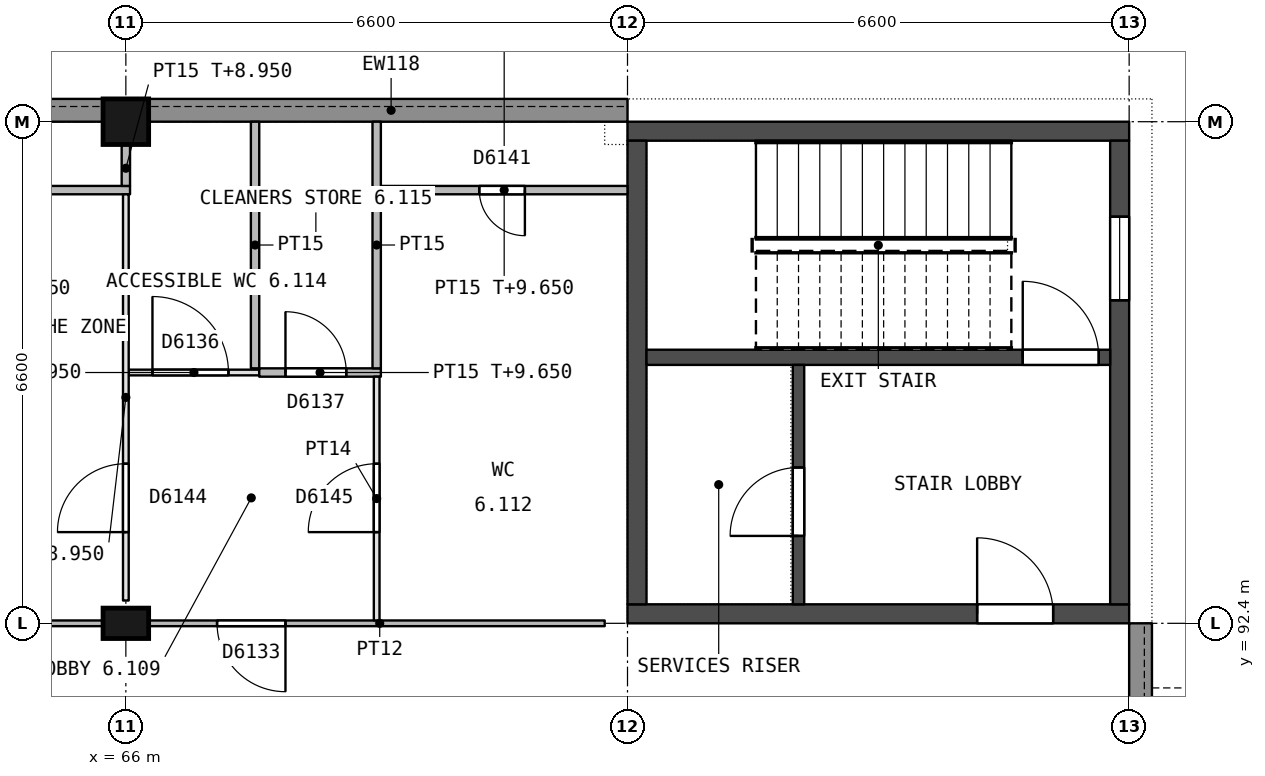
"""IFC4 building model, lengths in metres.
Left out: names, types, materials, properties, quantities, classifications, styles, units other than length and angle.
Written with IfcOpenShell. Run it as: python <this file> out.ifc"""

import sys

from ifc_helpers import new_model, si_unit, direction, frame, frame_2d, origin, origin_2d, place, context, subcontext, project, spatial, rectangle, extrude, element, fill, save


model = new_model("IFC4")
c1 = context("Model", 3, precision=1e-05, world=origin(), true_north=direction((0.0, 1.0)))
c2 = subcontext(c1, "Body", "Model", "MODEL_VIEW")
j1 = project(units=[si_unit("LENGTHUNIT", "METRE"), si_unit("PLANEANGLEUNIT", "RADIAN")], contexts=[c1])
p1 = place(None, origin())
s1 = spatial("IfcSite", under=j1, at=p1, CompositionType="ELEMENT")
p2 = place(p1, origin())
s2 = spatial("IfcBuilding", under=s1, at=p2, CompositionType="ELEMENT")
p3 = place(p2, frame((0.0, 0.0, 5.4)))
s3 = spatial("IfcBuildingStorey", under=s2, at=p3, CompositionType="ELEMENT", Elevation=5.4)
p4 = place(p3, frame((66.0, 92.4, 0.0), z_axis=(0.0, 0.0, 1.0), x_axis=(1.0, 0.0, 0.0)))
e1 = element("IfcColumn", 1, at=p4, inside=s3, PredefinedType="COLUMN", context=c2, shape_type="SweptSolid", body=[
    extrude(rectangle(XDim=0.6, YDim=0.4, at=origin_2d()), origin(), (0.0, 0.0, 1.0), 4.5),
])
p5 = place(p3, frame((66.0, 99.0, 0.0), z_axis=(0.0, 0.0, 1.0), x_axis=(1.0, 0.0, 0.0)))
e2 = element("IfcColumn", 2, at=p5, inside=s3, PredefinedType="COLUMN", context=c2, shape_type="SweptSolid", body=[
    extrude(rectangle(XDim=0.6, YDim=0.6, at=origin_2d()), origin(), (0.0, 0.0, 1.0), 4.5),
])
p6 = place(p3, frame((72.6, 92.525, 0.0), z_axis=(0.0, 0.0, 1.0), x_axis=(1.0, 0.0, 0.0)))
e3 = element("IfcWall", 3, at=p6, inside=s3, PredefinedType="SHEAR", context=c2, shape_type="SweptSolid", body=[
    extrude(rectangle(XDim=6.6, YDim=0.25, at=frame_2d((3.3, 0.0))), origin(), (0.0, 0.0, 1.0), 4.25),
])
p7 = place(p6, frame((4.6, 0.0, 0.0)))
e4 = element("IfcOpeningElement", 4, at=p7, cuts=e3, PredefinedType="OPENING", context=c2, shape_type="SweptSolid", body=[
    extrude(rectangle(XDim=1.0, YDim=2.1, at=frame_2d((0.5, 1.05))), frame((0.0, 0.135, 0.0), z_axis=(0.0, -1.0, 0.0), x_axis=(1.0, 0.0, 0.0)), (0.0, 0.0, 1.0), 0.27),
])
p8 = place(p3, frame((72.6, 98.875, 0.0), z_axis=(0.0, 0.0, 1.0), x_axis=(1.0, 0.0, 0.0)))
e5 = element("IfcWall", 5, at=p8, inside=s3, PredefinedType="SHEAR", context=c2, shape_type="SweptSolid", body=[
    extrude(rectangle(XDim=6.6, YDim=0.25, at=frame_2d((3.3, 0.0))), origin(), (0.0, 0.0, 1.0), 4.25),
])
p9 = place(p3, frame((79.075, 92.65, 0.0), z_axis=(0.0, 0.0, 1.0), x_axis=(0.0, 1.0, 0.0)))
e6 = element("IfcWall", 6, at=p9, inside=s3, PredefinedType="SHEAR", context=c2, shape_type="SweptSolid", body=[
    extrude(rectangle(XDim=6.1, YDim=0.25, at=frame_2d((3.05, 0.0))), origin(), (0.0, 0.0, 1.0), 4.25),
])
p10 = place(p9, frame((4.0, 0.0, 0.7)))
e7 = element("IfcOpeningElement", 7, at=p10, cuts=e6, PredefinedType="OPENING", context=c2, shape_type="SweptSolid", body=[
    extrude(rectangle(XDim=1.1, YDim=1.5, at=frame_2d((0.55, 0.75))), frame((0.0, 0.135, 0.0), z_axis=(0.0, -1.0, 0.0), x_axis=(1.0, 0.0, 0.0)), (0.0, 0.0, 1.0), 0.27),
])
p11 = place(p3, frame((72.725, 92.65, 0.0), z_axis=(0.0, 0.0, 1.0), x_axis=(0.0, 1.0, 0.0)))
e8 = element("IfcWall", 8, at=p11, inside=s3, PredefinedType="SHEAR", context=c2, shape_type="SweptSolid", body=[
    extrude(rectangle(XDim=6.1, YDim=0.25, at=frame_2d((3.05, 0.0))), origin(), (0.0, 0.0, 1.0), 4.25),
])
p12 = place(p3, frame((72.85, 95.9, 0.0), z_axis=(0.0, 0.0, 1.0), x_axis=(1.0, 0.0, 0.0)))
e9 = element("IfcWall", 9, at=p12, inside=s3, PredefinedType="SHEAR", context=c2, shape_type="SweptSolid", body=[
    extrude(rectangle(XDim=6.1, YDim=0.2, at=frame_2d((3.05, 0.0))), origin(), (0.0, 0.0, 1.0), 4.25),
])
p13 = place(p12, frame((4.95, 0.0, 0.0)))
e10 = element("IfcOpeningElement", 10, at=p13, cuts=e9, PredefinedType="OPENING", context=c2, shape_type="SweptSolid", body=[
    extrude(rectangle(XDim=1.0, YDim=2.1, at=frame_2d((0.5, 1.05))), frame((0.0, 0.11, 0.0), z_axis=(0.0, -1.0, 0.0), x_axis=(1.0, 0.0, 0.0)), (0.0, 0.0, 1.0), 0.22),
])
p14 = place(p3, frame((74.85, 92.65, 0.0), z_axis=(0.0, 0.0, 1.0), x_axis=(0.0, 1.0, 0.0)))
e11 = element("IfcWall", 11, at=p14, inside=s3, PredefinedType="SHEAR", context=c2, shape_type="SweptSolid", body=[
    extrude(rectangle(XDim=3.15, YDim=0.15, at=frame_2d((1.575, 0.0))), origin(), (0.0, 0.0, 1.0), 4.25),
])
p15 = place(p14, frame((0.9, 0.0, 0.0)))
e12 = element("IfcOpeningElement", 12, at=p15, cuts=e11, PredefinedType="OPENING", context=c2, shape_type="SweptSolid", body=[
    extrude(rectangle(XDim=0.9, YDim=2.1, at=frame_2d((0.45, 1.05))), frame((0.0, 0.085, 0.0), z_axis=(0.0, -1.0, 0.0), x_axis=(1.0, 0.0, 0.0)), (0.0, 0.0, 1.0), 0.17),
])
p16 = place(p3, frame((79.35, 92.4, 0.0), z_axis=(0.0, 0.0, 1.0), x_axis=(0.0, -1.0, 0.0)))
e13 = element("IfcWall", 13, at=p16, inside=s3, PredefinedType="STANDARD", context=c2, shape_type="SweptSolid", body=[
    extrude(rectangle(XDim=3.1, YDim=0.3, at=frame_2d((1.55, 0.0))), origin(), (0.0, 0.0, 1.0), 3.65),
])
p17 = place(p16, frame((1.05, 0.0, 1.1)))
e14 = element("IfcOpeningElement", 14, at=p17, cuts=e13, PredefinedType="OPENING", context=c2, shape_type="SweptSolid", body=[
    extrude(rectangle(XDim=1.2, YDim=1.2, at=frame_2d((0.6, 0.6))), frame((0.0, 0.16, 0.0), z_axis=(0.0, -1.0, 0.0), x_axis=(1.0, 0.0, 0.0)), (0.0, 0.0, 1.0), 0.32),
])
p18 = place(p3, frame((59.7, 99.15, 0.0), z_axis=(0.0, 0.0, 1.0), x_axis=(1.0, 0.0, 0.0)))
e15 = element("IfcWall", 15, at=p18, inside=s3, PredefinedType="STANDARD", context=c2, shape_type="SweptSolid", body=[
    extrude(rectangle(XDim=6.0, YDim=0.3, at=frame_2d((3.0, 0.0))), origin(), (0.0, 0.0, 1.0), 3.65),
])
p19 = place(p3, frame((66.3, 99.15, 0.0), z_axis=(0.0, 0.0, 1.0), x_axis=(1.0, 0.0, 0.0)))
e16 = element("IfcWall", 16, at=p19, inside=s3, PredefinedType="STANDARD", context=c2, shape_type="SweptSolid", body=[
    extrude(rectangle(XDim=6.3, YDim=0.3, at=frame_2d((3.15, 0.0))), origin(), (0.0, 0.0, 1.0), 3.65),
])
p20 = place(p3, frame((62.738, 92.4, 0.0), z_axis=(0.0, 0.0, 1.0), x_axis=(1.0, 0.0, 0.0)))
e17 = element("IfcWall", 17, at=p20, inside=s3, PredefinedType="PARTITIONING", context=c2, shape_type="SweptSolid", body=[
    extrude(rectangle(XDim=2.962, YDim=0.075, at=frame_2d((1.481, 0.0))), origin(), (0.0, 0.0, 1.0), 3.65),
])
p21 = place(p3, frame((66.3, 92.4, 0.0), z_axis=(0.0, 0.0, 1.0), x_axis=(1.0, 0.0, 0.0)))
e18 = element("IfcWall", 18, at=p21, inside=s3, PredefinedType="PARTITIONING", context=c2, shape_type="SweptSolid", body=[
    extrude(rectangle(XDim=6.0, YDim=0.075, at=frame_2d((3.0, 0.0))), origin(), (0.0, 0.0, 1.0), 3.65),
])
p22 = place(p21, frame((0.9, 0.0, 0.0)))
e19 = element("IfcOpeningElement", 19, at=p22, cuts=e18, PredefinedType="OPENING", context=c2, shape_type="SweptSolid", body=[
    extrude(rectangle(XDim=0.9, YDim=2.1, at=frame_2d((0.45, 1.05))), frame((0.0, 0.047, 0.0), z_axis=(0.0, -1.0, 0.0), x_axis=(1.0, 0.0, 0.0)), (0.0, 0.0, 1.0), 0.095),
])
p23 = place(p3, frame((67.755, 95.7, 0.0), z_axis=(0.0, 0.0, 1.0), x_axis=(-1.0, 0.0, 0.0)))
e20 = element("IfcWall", 20, at=p23, inside=s3, PredefinedType="PARTITIONING", context=c2, shape_type="SweptSolid", body=[
    extrude(rectangle(XDim=1.718, YDim=0.075, at=frame_2d((0.859, 0.0))), origin(), (0.0, 0.0, 1.0), 3.55),
])
p24 = place(p23, frame((0.405, 0.0, 0.0)))
e21 = element("IfcOpeningElement", 21, at=p24, cuts=e20, PredefinedType="OPENING", context=c2, shape_type="SweptSolid", body=[
    extrude(rectangle(XDim=1.0, YDim=2.1, at=frame_2d((0.5, 1.05))), frame((0.0, 0.047, 0.0), z_axis=(0.0, -1.0, 0.0), x_axis=(1.0, 0.0, 0.0)), (0.0, 0.0, 1.0), 0.095),
])
p25 = place(p3, frame((67.755, 95.7, 0.0), z_axis=(0.0, 0.0, 1.0), x_axis=(1.0, 0.0, 0.0)))
e22 = element("IfcWall", 22, at=p25, inside=s3, PredefinedType="PARTITIONING", context=c2, shape_type="SweptSolid", body=[
    extrude(rectangle(XDim=1.6, YDim=0.11, at=frame_2d((0.8, 0.0))), origin(), (0.0, 0.0, 1.0), 4.25),
])
p26 = place(p25, frame((0.345, 0.0, 0.0)))
e23 = element("IfcOpeningElement", 23, at=p26, cuts=e22, PredefinedType="OPENING", context=c2, shape_type="SweptSolid", body=[
    extrude(rectangle(XDim=0.8, YDim=2.1, at=frame_2d((0.4, 1.05))), frame((0.0, 0.065, 0.0), z_axis=(0.0, -1.0, 0.0), x_axis=(1.0, 0.0, 0.0)), (0.0, 0.0, 1.0), 0.13),
])
p27 = place(p3, frame((66.055, 98.1, 0.0), z_axis=(0.0, 0.0, 1.0), x_axis=(-1.0, 0.0, 0.0)))
e24 = element("IfcWall", 24, at=p27, inside=s3, PredefinedType="PARTITIONING", context=c2, shape_type="SweptSolid", body=[
    extrude(rectangle(XDim=3.41, YDim=0.11, at=frame_2d((1.705, 0.0))), origin(), (0.0, 0.0, 1.0), 3.55),
])
p28 = place(p27, frame((1.405, 0.0, 0.0)))
e25 = element("IfcOpeningElement", 25, at=p28, cuts=e24, PredefinedType="OPENING", context=c2, shape_type="SweptSolid", body=[
    extrude(rectangle(XDim=0.6, YDim=2.1, at=frame_2d((0.3, 1.05))), frame((0.0, 0.065, 0.0), z_axis=(0.0, -1.0, 0.0), x_axis=(1.0, 0.0, 0.0)), (0.0, 0.0, 1.0), 0.13),
])
p29 = place(p3, frame((72.6, 98.1, 0.0), z_axis=(0.0, 0.0, 1.0), x_axis=(-1.0, 0.0, 0.0)))
e26 = element("IfcWall", 26, at=p29, inside=s3, PredefinedType="PARTITIONING", context=c2, shape_type="SweptSolid", body=[
    extrude(rectangle(XDim=3.245, YDim=0.11, at=frame_2d((1.623, 0.0))), origin(), (0.0, 0.0, 1.0), 4.25),
])
p30 = place(p29, frame((1.35, 0.0, 0.0)))
e27 = element("IfcOpeningElement", 27, at=p30, cuts=e26, PredefinedType="OPENING", context=c2, shape_type="SweptSolid", body=[
    extrude(rectangle(XDim=0.6, YDim=2.1, at=frame_2d((0.3, 1.05))), frame((0.0, 0.065, 0.0), z_axis=(0.0, -1.0, 0.0), x_axis=(1.0, 0.0, 0.0)), (0.0, 0.0, 1.0), 0.13),
])
p31 = place(p3, frame((66.0, 92.7, 0.0), z_axis=(0.0, 0.0, 1.0), x_axis=(0.0, 1.0, 0.0)))
e28 = element("IfcWall", 28, at=p31, inside=s3, PredefinedType="PARTITIONING", context=c2, shape_type="SweptSolid", body=[
    extrude(rectangle(XDim=5.345, YDim=0.075, at=frame_2d((2.672, 0.0))), origin(), (0.0, 0.0, 1.0), 3.55),
])
p32 = place(p31, frame((0.9, 0.0, 0.0)))
e29 = element("IfcOpeningElement", 29, at=p32, cuts=e28, PredefinedType="OPENING", context=c2, shape_type="SweptSolid", body=[
    extrude(rectangle(XDim=0.9, YDim=2.1, at=frame_2d((0.45, 1.05))), frame((0.0, 0.047, 0.0), z_axis=(0.0, -1.0, 0.0), x_axis=(1.0, 0.0, 0.0)), (0.0, 0.0, 1.0), 0.095),
])
p33 = place(p3, frame((66.0, 98.155, 0.0), z_axis=(0.0, 0.0, 1.0), x_axis=(0.0, 1.0, 0.0)))
e30 = element("IfcWall", 30, at=p33, inside=s3, PredefinedType="PARTITIONING", context=c2, shape_type="SweptSolid", body=[
    extrude(rectangle(XDim=0.545, YDim=0.11, at=frame_2d((0.272, 0.0))), origin(), (0.0, 0.0, 1.0), 3.55),
])
p34 = place(p3, frame((67.7, 95.755, 0.0), z_axis=(0.0, 0.0, 1.0), x_axis=(0.0, 1.0, 0.0)))
e31 = element("IfcWall", 31, at=p34, inside=s3, PredefinedType="PARTITIONING", context=c2, shape_type="SweptSolid", body=[
    extrude(rectangle(XDim=3.245, YDim=0.11, at=frame_2d((1.623, 0.0))), origin(), (0.0, 0.0, 1.0), 3.65),
])
p35 = place(p3, frame((69.3, 95.645, 0.0), z_axis=(0.0, 0.0, 1.0), x_axis=(0.0, -1.0, 0.0)))
e32 = element("IfcWall", 32, at=p35, inside=s3, PredefinedType="PARTITIONING", context=c2, shape_type="SweptSolid", body=[
    extrude(rectangle(XDim=3.207, YDim=0.075, at=frame_2d((1.604, 0.0))), origin(), (0.0, 0.0, 1.0), 3.65),
])
p36 = place(p35, frame((1.145, 0.0, 0.0)))
e33 = element("IfcOpeningElement", 33, at=p36, cuts=e32, PredefinedType="OPENING", context=c2, shape_type="SweptSolid", body=[
    extrude(rectangle(XDim=0.9, YDim=2.1, at=frame_2d((0.45, 1.05))), frame((0.0, 0.047, 0.0), z_axis=(0.0, -1.0, 0.0), x_axis=(1.0, 0.0, 0.0)), (0.0, 0.0, 1.0), 0.095),
])
p37 = place(p3, frame((69.3, 95.755, 0.0), z_axis=(0.0, 0.0, 1.0), x_axis=(0.0, 1.0, 0.0)))
e34 = element("IfcWall", 34, at=p37, inside=s3, PredefinedType="PARTITIONING", context=c2, shape_type="SweptSolid", body=[
    extrude(rectangle(XDim=3.245, YDim=0.11, at=frame_2d((1.623, 0.0))), origin(), (0.0, 0.0, 1.0), 3.65),
])
p38 = place(p15, origin())
e35 = element("IfcDoor", 35, at=p38, inside=s3, OperationType="SINGLE_SWING_LEFT", PredefinedType="DOOR", context=c2, shape_type="SweptSolid", body=[
    extrude(rectangle(XDim=0.9, YDim=2.1, at=frame_2d((0.45, 1.05))), frame((0.0, 0.025, 0.0), z_axis=(0.0, -1.0, 0.0), x_axis=(1.0, 0.0, 0.0)), (0.0, 0.0, 1.0), 0.05),
])
fill(e12, e35)
p39 = place(p7, origin())
e36 = element("IfcDoor", 36, at=p39, inside=s3, OperationType="SINGLE_SWING_LEFT", PredefinedType="DOOR", context=c2, shape_type="SweptSolid", body=[
    extrude(rectangle(XDim=1.0, YDim=2.1, at=frame_2d((0.5, 1.05))), frame((0.0, 0.025, 0.0), z_axis=(0.0, -1.0, 0.0), x_axis=(1.0, 0.0, 0.0)), (0.0, 0.0, 1.0), 0.05),
])
fill(e4, e36)
p40 = place(p13, origin())
e37 = element("IfcDoor", 37, at=p40, inside=s3, OperationType="SINGLE_SWING_LEFT", PredefinedType="DOOR", context=c2, shape_type="SweptSolid", body=[
    extrude(rectangle(XDim=1.0, YDim=2.1, at=frame_2d((0.5, 1.05))), frame((0.0, 0.025, 0.0), z_axis=(0.0, -1.0, 0.0), x_axis=(1.0, 0.0, 0.0)), (0.0, 0.0, 1.0), 0.05),
])
fill(e10, e37)
p41 = place(p10, origin())
e38 = element("IfcWindow", 38, at=p41, inside=s3, PartitioningType="SINGLE_PANEL", PredefinedType="WINDOW", context=c2, shape_type="SweptSolid", body=[
    extrude(rectangle(XDim=1.1, YDim=1.5, at=frame_2d((0.55, 0.75))), frame((0.0, 0.03, 0.0), z_axis=(0.0, -1.0, 0.0), x_axis=(1.0, 0.0, 0.0)), (0.0, 0.0, 1.0), 0.06),
])
fill(e7, e38)
p42 = place(p22, origin())
e39 = element("IfcDoor", 39, at=p42, inside=s3, OperationType="SINGLE_SWING_RIGHT", PredefinedType="DOOR", context=c2, shape_type="SweptSolid", body=[
    extrude(rectangle(XDim=0.9, YDim=2.1, at=frame_2d((0.45, 1.05))), frame((0.0, 0.025, 0.0), z_axis=(0.0, -1.0, 0.0), x_axis=(1.0, 0.0, 0.0)), (0.0, 0.0, 1.0), 0.05),
])
fill(e19, e39)
p43 = place(p24, origin())
e40 = element("IfcDoor", 40, at=p43, inside=s3, OperationType="SINGLE_SWING_RIGHT", PredefinedType="DOOR", context=c2, shape_type="SweptSolid", body=[
    extrude(rectangle(XDim=1.0, YDim=2.1, at=frame_2d((0.5, 1.05))), frame((0.0, 0.025, 0.0), z_axis=(0.0, -1.0, 0.0), x_axis=(1.0, 0.0, 0.0)), (0.0, 0.0, 1.0), 0.05),
])
fill(e21, e40)
p44 = place(p26, origin())
e41 = element("IfcDoor", 41, at=p44, inside=s3, OperationType="SINGLE_SWING_LEFT", PredefinedType="DOOR", context=c2, shape_type="SweptSolid", body=[
    extrude(rectangle(XDim=0.8, YDim=2.1, at=frame_2d((0.4, 1.05))), frame((0.0, 0.025, 0.0), z_axis=(0.0, -1.0, 0.0), x_axis=(1.0, 0.0, 0.0)), (0.0, 0.0, 1.0), 0.05),
])
fill(e23, e41)
p45 = place(p30, origin())
e42 = element("IfcDoor", 42, at=p45, inside=s3, OperationType="SINGLE_SWING_LEFT", PredefinedType="DOOR", context=c2, shape_type="SweptSolid", body=[
    extrude(rectangle(XDim=0.6, YDim=2.1, at=frame_2d((0.3, 1.05))), frame((0.0, 0.025, 0.0), z_axis=(0.0, -1.0, 0.0), x_axis=(1.0, 0.0, 0.0)), (0.0, 0.0, 1.0), 0.05),
])
fill(e27, e42)
p46 = place(p32, origin())
e43 = element("IfcDoor", 43, at=p46, inside=s3, OperationType="SINGLE_SWING_LEFT", PredefinedType="DOOR", context=c2, shape_type="SweptSolid", body=[
    extrude(rectangle(XDim=0.9, YDim=2.1, at=frame_2d((0.45, 1.05))), frame((0.0, 0.025, 0.0), z_axis=(0.0, -1.0, 0.0), x_axis=(1.0, 0.0, 0.0)), (0.0, 0.0, 1.0), 0.05),
])
fill(e29, e43)
p47 = place(p36, origin())
e44 = element("IfcDoor", 44, at=p47, inside=s3, OperationType="SINGLE_SWING_RIGHT", PredefinedType="DOOR", context=c2, shape_type="SweptSolid", body=[
    extrude(rectangle(XDim=0.9, YDim=2.1, at=frame_2d((0.45, 1.05))), frame((0.0, 0.025, 0.0), z_axis=(0.0, -1.0, 0.0), x_axis=(1.0, 0.0, 0.0)), (0.0, 0.0, 1.0), 0.05),
])
fill(e33, e44)
save(model, sys.argv[1])
